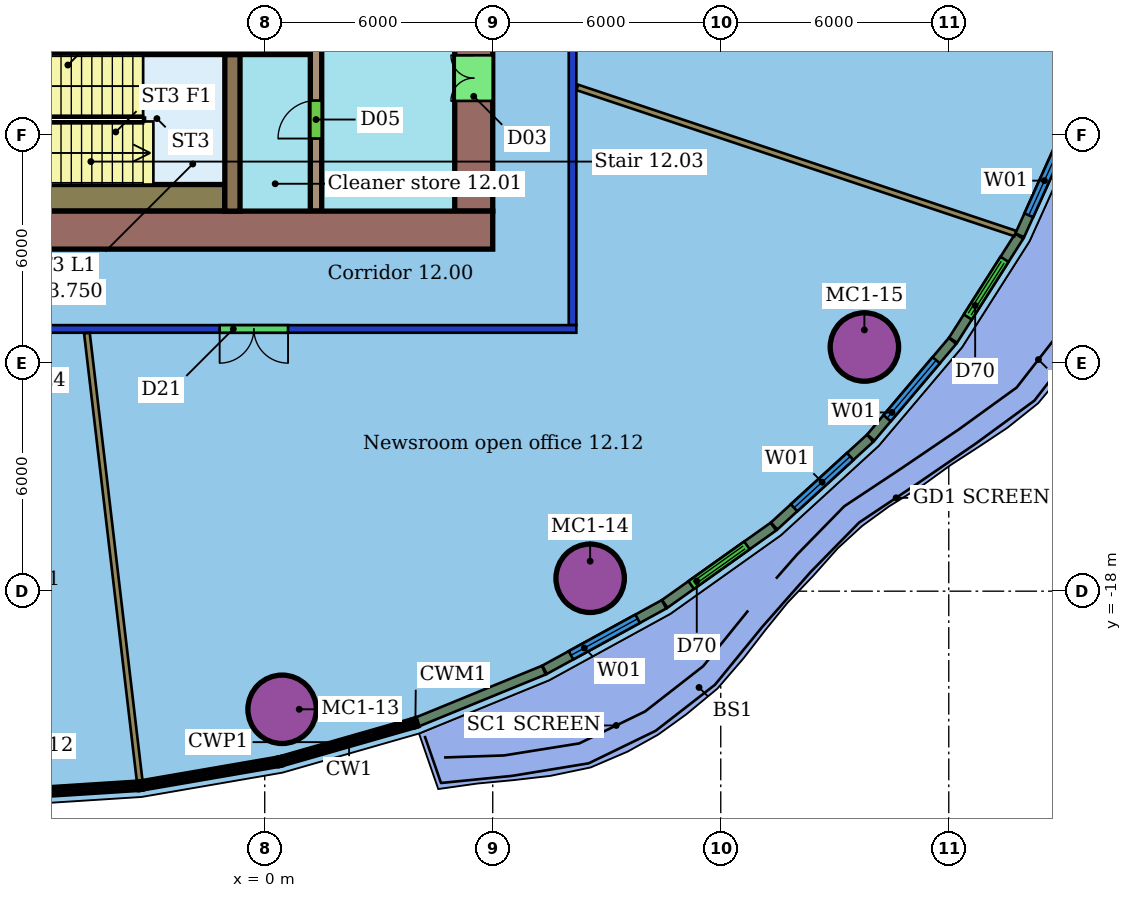
"""IFC4 building model, lengths in metres.
Left out: names, types, materials, properties, quantities, classifications, styles, units other than length and angle.
Written with IfcOpenShell. Run it as: python <this file> out.ifc"""

import sys

from ifc_helpers import new_model, si_unit, direction, frame, frame_2d, origin, origin_2d, place, context, subcontext, project, spatial, rectangle, hollow_circle, extrude, element, fill, save


model = new_model("IFC4")
c1 = context("Model", 3, precision=1e-05, world=origin(), true_north=direction((0.0, 1.0)))
c2 = subcontext(c1, "Body", "Model", "MODEL_VIEW")
j1 = project(units=[si_unit("LENGTHUNIT", "METRE"), si_unit("PLANEANGLEUNIT", "RADIAN")], contexts=[c1])
p1 = place(None, origin())
s1 = spatial("IfcSite", under=j1, at=p1, CompositionType="ELEMENT")
p2 = place(p1, origin())
s2 = spatial("IfcBuilding", under=s1, at=p2, CompositionType="ELEMENT")
p3 = place(p2, frame((0.0, 0.0, 61.9)))
s3 = spatial("IfcBuildingStorey", under=s2, at=p3, CompositionType="ELEMENT", Elevation=61.9)
for number, where, z_axis, x_axis in (
    (1, (0.458, -21.108, 0.0), (0.0, 0.0, 1.0), (1.0, 0.0, 0.0)),
    (2, (8.563, -17.66, 0.0), (0.0, 0.0, 1.0), (1.0, 0.0, 0.0)),
    (3, (15.78, -11.576, 0.0), (0.0, 0.0, 1.0), (1.0, 0.0, 0.0)),
):
    element("IfcColumn", number, at=place(p3, frame(where, z_axis=z_axis, x_axis=x_axis)), inside=s3, PredefinedType="COLUMN", context=c2, shape_type="SweptSolid", body=[
        extrude(hollow_circle(Radius=0.9, WallThickness=0.06, at=origin_2d()), origin(), (0.0, 0.0, 1.0), 3.55),
    ])
p4 = place(p3, frame((8.2, -11.1, 0.0), z_axis=(0.0, 0.0, 1.0), x_axis=(-1.0, 0.0, 0.0)))
e4 = element("IfcWall", 4, at=p4, inside=s3, PredefinedType="PARTITIONING", context=c2, shape_type="SweptSolid", body=[
    extrude(rectangle(XDim=28.4, YDim=0.2, at=frame_2d((14.2, 0.0))), origin(), (0.0, 0.0, 1.0), 2.85),
])
p5 = place(p4, frame((20.22, 0.0, 0.0)))
e5 = element("IfcOpeningElement", 5, at=p5, cuts=e4, PredefinedType="OPENING", context=c2, shape_type="SweptSolid", body=[
    extrude(rectangle(XDim=1.1, YDim=2.1, at=frame_2d((0.55, 1.05))), frame((0.0, 0.11, 0.0), z_axis=(0.0, -1.0, 0.0), x_axis=(1.0, 0.0, 0.0)), (0.0, 0.0, 1.0), 0.22),
])
p6 = place(p4, frame((15.445, 0.0, 0.0)))
e6 = element("IfcOpeningElement", 6, at=p6, cuts=e4, PredefinedType="OPENING", context=c2, shape_type="SweptSolid", body=[
    extrude(rectangle(XDim=1.5, YDim=2.1, at=frame_2d((0.75, 1.05))), frame((0.0, 0.11, 0.0), z_axis=(0.0, -1.0, 0.0), x_axis=(1.0, 0.0, 0.0)), (0.0, 0.0, 1.0), 0.22),
])
p7 = place(p4, frame((7.586, 0.0, 0.0)))
e7 = element("IfcOpeningElement", 7, at=p7, cuts=e4, PredefinedType="OPENING", context=c2, shape_type="SweptSolid", body=[
    extrude(rectangle(XDim=1.8, YDim=2.1, at=frame_2d((0.9, 1.05))), frame((0.0, 0.11, 0.0), z_axis=(0.0, -1.0, 0.0), x_axis=(1.0, 0.0, 0.0)), (0.0, 0.0, 1.0), 0.22),
])
p8 = place(p3, frame((8.1, 11.0, 0.0), z_axis=(0.0, 0.0, 1.0), x_axis=(0.0, -1.0, 0.0)))
e8 = element("IfcWall", 8, at=p8, inside=s3, PredefinedType="PARTITIONING", context=c2, shape_type="SweptSolid", body=[
    extrude(rectangle(XDim=22.0, YDim=0.2, at=frame_2d((11.0, 0.0))), origin(), (0.0, 0.0, 1.0), 2.85),
])
p9 = place(p8, frame((6.209, 0.0, 0.0)))
e9 = element("IfcOpeningElement", 9, at=p9, cuts=e8, PredefinedType="OPENING", context=c2, shape_type="SweptSolid", body=[
    extrude(rectangle(XDim=1.1, YDim=2.1, at=frame_2d((0.55, 1.05))), frame((0.0, 0.11, 0.0), z_axis=(0.0, -1.0, 0.0), x_axis=(1.0, 0.0, 0.0)), (0.0, 0.0, 1.0), 0.22),
])
p10 = place(p8, frame((12.983, 0.0, 0.0)))
e10 = element("IfcOpeningElement", 10, at=p10, cuts=e8, PredefinedType="OPENING", context=c2, shape_type="SweptSolid", body=[
    extrude(rectangle(XDim=0.9, YDim=2.1, at=frame_2d((0.45, 1.05))), frame((0.0, 0.11, 0.0), z_axis=(0.0, -1.0, 0.0), x_axis=(1.0, 0.0, 0.0)), (0.0, 0.0, 1.0), 0.22),
])
p11 = place(p3, frame((-3.291, -22.993, 0.0), z_axis=(0.0, 0.0, 1.0), x_axis=(-0.117014349032, 0.99313022415, 0.0)))
e11 = element("IfcWall", 11, at=p11, inside=s3, PredefinedType="PARTITIONING", context=c2, shape_type="SweptSolid", body=[
    extrude(rectangle(XDim=11.865, YDim=0.15, at=frame_2d((5.933, 0.0))), origin(), (0.0, 0.0, 1.0), 3.55),
])
p12 = place(p3, frame((19.752, -8.589, 0.0), z_axis=(0.0, 0.0, 1.0), x_axis=(-0.948621001224, 0.316414595169, 0.0)))
e12 = element("IfcWall", 12, at=p12, inside=s3, PredefinedType="PARTITIONING", context=c2, shape_type="SweptSolid", body=[
    extrude(rectangle(XDim=12.152, YDim=0.15, at=frame_2d((6.076, 0.0))), origin(), (0.0, 0.0, 1.0), 3.55),
])
p13 = place(p3, frame((4.013, -21.441, 0.0), z_axis=(0.0, 0.0, 1.0), x_axis=(0.925429153504, 0.378920680149, 0.0)))
e13 = element("IfcWall", 13, at=p13, inside=s3, PredefinedType="SOLIDWALL", context=c2, shape_type="SweptSolid", body=[
    extrude(rectangle(XDim=3.6, YDim=0.25, at=frame_2d((1.8, 0.0))), origin(), (0.0, 0.0, 1.0), 3.15),
])
p14 = place(p3, frame((7.365, -20.068, 0.0), z_axis=(0.0, 0.0, 1.0), x_axis=(0.876938377575, 0.480602831802, 0.0)))
e14 = element("IfcWall", 14, at=p14, inside=s3, PredefinedType="SOLIDWALL", context=c2, shape_type="SweptSolid", body=[
    extrude(rectangle(XDim=3.584, YDim=0.25, at=frame_2d((1.792, 0.0))), origin(), (0.0, 0.0, 1.0), 3.15),
])
p15 = place(p14, frame((0.792, 0.0, 0.8)))
e15 = element("IfcOpeningElement", 15, at=p15, cuts=e14, PredefinedType="OPENING", context=c2, shape_type="SweptSolid", body=[
    extrude(rectangle(XDim=2.0, YDim=2.2, at=frame_2d((1.0, 1.1))), frame((0.0, 0.135, 0.0), z_axis=(0.0, -1.0, 0.0), x_axis=(1.0, 0.0, 0.0)), (0.0, 0.0, 1.0), 0.27),
])
p16 = place(p3, frame((10.526, -18.333, 0.0), z_axis=(0.0, 0.0, 1.0), x_axis=(0.814907125468, 0.579591560378, 0.0)))
e16 = element("IfcWall", 16, at=p16, inside=s3, PredefinedType="SOLIDWALL", context=c2, shape_type="SweptSolid", body=[
    extrude(rectangle(XDim=3.509, YDim=0.25, at=frame_2d((1.754, 0.0))), origin(), (0.0, 0.0, 1.0), 3.15),
])
p17 = place(p16, frame((0.854, 0.0, 0.0)))
e17 = element("IfcOpeningElement", 17, at=p17, cuts=e16, PredefinedType="OPENING", context=c2, shape_type="SweptSolid", body=[
    extrude(rectangle(XDim=1.8, YDim=2.4, at=frame_2d((0.9, 1.2))), frame((0.0, 0.135, 0.0), z_axis=(0.0, -1.0, 0.0), x_axis=(1.0, 0.0, 0.0)), (0.0, 0.0, 1.0), 0.27),
])
p18 = place(p3, frame((13.404, -16.285, 0.0), z_axis=(0.0, 0.0, 1.0), x_axis=(0.738233763611, 0.67454496534, 0.0)))
e18 = element("IfcWall", 18, at=p18, inside=s3, PredefinedType="SOLIDWALL", context=c2, shape_type="SweptSolid", body=[
    extrude(rectangle(XDim=3.423, YDim=0.25, at=frame_2d((1.711, 0.0))), origin(), (0.0, 0.0, 1.0), 3.15),
])
p19 = place(p18, frame((0.712, 0.0, 0.8)))
e19 = element("IfcOpeningElement", 19, at=p19, cuts=e18, PredefinedType="OPENING", context=c2, shape_type="SweptSolid", body=[
    extrude(rectangle(XDim=2.0, YDim=2.2, at=frame_2d((1.0, 1.1))), frame((0.0, 0.135, 0.0), z_axis=(0.0, -1.0, 0.0), x_axis=(1.0, 0.0, 0.0)), (0.0, 0.0, 1.0), 0.27),
])
p20 = place(p3, frame((15.948, -13.959, 0.0), z_axis=(0.0, 0.0, 1.0), x_axis=(0.645781290873, 0.763522445222, 0.0)))
e20 = element("IfcWall", 20, at=p20, inside=s3, PredefinedType="SOLIDWALL", context=c2, shape_type="SweptSolid", body=[
    extrude(rectangle(XDim=3.332, YDim=0.25, at=frame_2d((1.666, 0.0))), origin(), (0.0, 0.0, 1.0), 3.15),
])
p21 = place(p20, frame((0.666, 0.0, 0.8)))
e21 = element("IfcOpeningElement", 21, at=p21, cuts=e20, PredefinedType="OPENING", context=c2, shape_type="SweptSolid", body=[
    extrude(rectangle(XDim=2.0, YDim=2.2, at=frame_2d((1.0, 1.1))), frame((0.0, 0.135, 0.0), z_axis=(0.0, -1.0, 0.0), x_axis=(1.0, 0.0, 0.0)), (0.0, 0.0, 1.0), 0.27),
])
p22 = place(p3, frame((18.114, -11.395, 0.0), z_axis=(0.0, 0.0, 1.0), x_axis=(0.536899857644, 0.843645981951, 0.0)))
e22 = element("IfcWall", 22, at=p22, inside=s3, PredefinedType="SOLIDWALL", context=c2, shape_type="SweptSolid", body=[
    extrude(rectangle(XDim=3.242, YDim=0.25, at=frame_2d((1.621, 0.0))), origin(), (0.0, 0.0, 1.0), 3.15),
])
p23 = place(p22, frame((0.721, 0.0, 0.0)))
e23 = element("IfcOpeningElement", 23, at=p23, cuts=e22, PredefinedType="OPENING", context=c2, shape_type="SweptSolid", body=[
    extrude(rectangle(XDim=1.8, YDim=2.4, at=frame_2d((0.9, 1.2))), frame((0.0, 0.135, 0.0), z_axis=(0.0, -1.0, 0.0), x_axis=(1.0, 0.0, 0.0)), (0.0, 0.0, 1.0), 0.27),
])
p24 = place(p3, frame((19.867, -8.637, 0.0), z_axis=(0.0, 0.0, 1.0), x_axis=(0.411804193901, 0.911272355493, 0.0)))
e24 = element("IfcWall", 24, at=p24, inside=s3, PredefinedType="SOLIDWALL", context=c2, shape_type="SweptSolid", body=[
    extrude(rectangle(XDim=3.158, YDim=0.25, at=frame_2d((1.579, 0.0))), origin(), (0.0, 0.0, 1.0), 3.15),
])
p25 = place(p24, frame((0.579, 0.0, 0.8)))
e25 = element("IfcOpeningElement", 25, at=p25, cuts=e24, PredefinedType="OPENING", context=c2, shape_type="SweptSolid", body=[
    extrude(rectangle(XDim=2.0, YDim=2.2, at=frame_2d((1.0, 1.1))), frame((0.0, 0.135, 0.0), z_axis=(0.0, -1.0, 0.0), x_axis=(1.0, 0.0, 0.0)), (0.0, 0.0, 1.0), 0.27),
])
p26 = place(p3, frame((-18.0, -8.5, 0.0), z_axis=(0.0, 0.0, 1.0), x_axis=(1.0, 0.0, 0.0)))
e26 = element("IfcWall", 26, at=p26, inside=s3, PredefinedType="SHEAR", context=c2, shape_type="SweptSolid", body=[
    extrude(rectangle(XDim=24.0, YDim=1.0, at=frame_2d((12.0, 0.0))), origin(), (0.0, 0.0, 1.0), 3.4),
])
p27 = place(p26, frame((6.0, 0.0, 0.0)))
e27 = element("IfcOpeningElement", 27, at=p27, cuts=e26, PredefinedType="OPENING", context=c2, shape_type="SweptSolid", body=[
    extrude(rectangle(XDim=1.2, YDim=2.1, at=frame_2d((0.6, 1.05))), frame((0.0, 0.51, 0.0), z_axis=(0.0, -1.0, 0.0), x_axis=(1.0, 0.0, 0.0)), (0.0, 0.0, 1.0), 1.02),
])
p28 = place(p3, frame((5.5, -8.0, 0.0), z_axis=(0.0, 0.0, 1.0), x_axis=(0.0, 1.0, 0.0)))
e28 = element("IfcWall", 28, at=p28, inside=s3, PredefinedType="SHEAR", context=c2, shape_type="SweptSolid", body=[
    extrude(rectangle(XDim=16.0, YDim=1.0, at=frame_2d((8.0, 0.0))), origin(), (0.0, 0.0, 1.0), 3.4),
])
p29 = place(p28, frame((2.9, 0.0, 0.0)))
e29 = element("IfcOpeningElement", 29, at=p29, cuts=e28, PredefinedType="OPENING", context=c2, shape_type="SweptSolid", body=[
    extrude(rectangle(XDim=1.2, YDim=2.1, at=frame_2d((0.6, 1.05))), frame((0.0, 0.51, 0.0), z_axis=(0.0, -1.0, 0.0), x_axis=(1.0, 0.0, 0.0)), (0.0, 0.0, 1.0), 1.02),
])
p30 = place(p28, frame((11.9, 0.0, 0.0)))
e30 = element("IfcOpeningElement", 30, at=p30, cuts=e28, PredefinedType="OPENING", context=c2, shape_type="SweptSolid", body=[
    extrude(rectangle(XDim=1.2, YDim=2.1, at=frame_2d((0.6, 1.05))), frame((0.0, 0.51, 0.0), z_axis=(0.0, -1.0, 0.0), x_axis=(1.0, 0.0, 0.0)), (0.0, 0.0, 1.0), 1.02),
])
p31 = place(p3, frame((-6.0, -3.58, 0.0), z_axis=(0.0, 0.0, 1.0), x_axis=(1.0, 0.0, 0.0)))
e31 = element("IfcWall", 31, at=p31, inside=s3, PredefinedType="SHEAR", context=c2, shape_type="SweptSolid", body=[
    extrude(rectangle(XDim=7.2, YDim=0.6, at=frame_2d((3.6, 0.0))), origin(), (0.0, 0.0, 1.0), 3.4),
])
p32 = place(p3, frame((1.35, -8.0, 0.0), z_axis=(0.0, 0.0, 1.0), x_axis=(0.0, 1.0, 0.0)))
e32 = element("IfcWall", 32, at=p32, inside=s3, PredefinedType="SHEAR", context=c2, shape_type="SweptSolid", body=[
    extrude(rectangle(XDim=16.0, YDim=0.3, at=frame_2d((8.0, 0.0))), origin(), (0.0, 0.0, 1.0), 3.4),
])
p33 = place(p32, frame((1.91, 0.0, 0.0)))
e33 = element("IfcOpeningElement", 33, at=p33, cuts=e32, PredefinedType="OPENING", context=c2, shape_type="SweptSolid", body=[
    extrude(rectangle(XDim=1.0, YDim=2.1, at=frame_2d((0.5, 1.05))), frame((0.0, 0.16, 0.0), z_axis=(0.0, -1.0, 0.0), x_axis=(1.0, 0.0, 0.0)), (0.0, 0.0, 1.0), 0.32),
])
p34 = place(p32, frame((7.25, 0.0, 0.0)))
e34 = element("IfcOpeningElement", 34, at=p34, cuts=e32, PredefinedType="OPENING", context=c2, shape_type="SweptSolid", body=[
    extrude(rectangle(XDim=1.5, YDim=2.1, at=frame_2d((0.75, 1.05))), frame((0.0, 0.16, 0.0), z_axis=(0.0, -1.0, 0.0), x_axis=(1.0, 0.0, 0.0)), (0.0, 0.0, 1.0), 0.32),
])
p35 = place(p3, frame((-0.85, -3.88, 0.0), z_axis=(0.0, 0.0, 1.0), x_axis=(0.0, -1.0, 0.0)))
e35 = element("IfcWall", 35, at=p35, inside=s3, PredefinedType="SHEAR", context=c2, shape_type="SweptSolid", body=[
    extrude(rectangle(XDim=4.12, YDim=0.4, at=frame_2d((2.06, 0.0))), origin(), (0.0, 0.0, 1.0), 3.4),
])
p36 = place(p3, frame((-8.1, -7.65, 0.0), z_axis=(0.0, 0.0, 1.0), x_axis=(1.0, 0.0, 0.0)))
e36 = element("IfcWall", 36, at=p36, inside=s3, PredefinedType="SHEAR", context=c2, shape_type="SweptSolid", body=[
    extrude(rectangle(XDim=7.05, YDim=0.7, at=frame_2d((3.525, 0.0))), origin(), (0.0, 0.0, 1.0), 3.4),
])
p37 = place(p7, origin())
e37 = element("IfcDoor", 37, at=p37, inside=s3, OperationType="DOUBLE_DOOR_SINGLE_SWING", PredefinedType="DOOR", context=c2, shape_type="SweptSolid", body=[
    extrude(rectangle(XDim=1.8, YDim=2.1, at=frame_2d((0.9, 1.05))), frame((0.0, 0.025, 0.0), z_axis=(0.0, -1.0, 0.0), x_axis=(1.0, 0.0, 0.0)), (0.0, 0.0, 1.0), 0.05),
])
fill(e7, e37)
p38 = place(p15, origin())
e38 = element("IfcWindow", 38, at=p38, inside=s3, PartitioningType="SINGLE_PANEL", PredefinedType="WINDOW", context=c2, shape_type="SweptSolid", body=[
    extrude(rectangle(XDim=2.0, YDim=2.2, at=frame_2d((1.0, 1.1))), frame((0.0, 0.03, 0.0), z_axis=(0.0, -1.0, 0.0), x_axis=(1.0, 0.0, 0.0)), (0.0, 0.0, 1.0), 0.06),
])
fill(e15, e38)
p39 = place(p17, origin())
e39 = element("IfcDoor", 39, at=p39, inside=s3, OperationType="DOUBLE_DOOR_SLIDING", PredefinedType="DOOR", context=c2, shape_type="SweptSolid", body=[
    extrude(rectangle(XDim=1.8, YDim=2.4, at=frame_2d((0.9, 1.2))), frame((0.0, 0.025, 0.0), z_axis=(0.0, -1.0, 0.0), x_axis=(1.0, 0.0, 0.0)), (0.0, 0.0, 1.0), 0.05),
])
fill(e17, e39)
p40 = place(p19, origin())
e40 = element("IfcWindow", 40, at=p40, inside=s3, PartitioningType="SINGLE_PANEL", PredefinedType="WINDOW", context=c2, shape_type="SweptSolid", body=[
    extrude(rectangle(XDim=2.0, YDim=2.2, at=frame_2d((1.0, 1.1))), frame((0.0, 0.03, 0.0), z_axis=(0.0, -1.0, 0.0), x_axis=(1.0, 0.0, 0.0)), (0.0, 0.0, 1.0), 0.06),
])
fill(e19, e40)
p41 = place(p21, origin())
e41 = element("IfcWindow", 41, at=p41, inside=s3, PartitioningType="SINGLE_PANEL", PredefinedType="WINDOW", context=c2, shape_type="SweptSolid", body=[
    extrude(rectangle(XDim=2.0, YDim=2.2, at=frame_2d((1.0, 1.1))), frame((0.0, 0.03, 0.0), z_axis=(0.0, -1.0, 0.0), x_axis=(1.0, 0.0, 0.0)), (0.0, 0.0, 1.0), 0.06),
])
fill(e21, e41)
p42 = place(p23, origin())
e42 = element("IfcDoor", 42, at=p42, inside=s3, OperationType="DOUBLE_DOOR_SLIDING", PredefinedType="DOOR", context=c2, shape_type="SweptSolid", body=[
    extrude(rectangle(XDim=1.8, YDim=2.4, at=frame_2d((0.9, 1.2))), frame((0.0, 0.025, 0.0), z_axis=(0.0, -1.0, 0.0), x_axis=(1.0, 0.0, 0.0)), (0.0, 0.0, 1.0), 0.05),
])
fill(e23, e42)
p43 = place(p25, origin())
e43 = element("IfcWindow", 43, at=p43, inside=s3, PartitioningType="SINGLE_PANEL", PredefinedType="WINDOW", context=c2, shape_type="SweptSolid", body=[
    extrude(rectangle(XDim=2.0, YDim=2.2, at=frame_2d((1.0, 1.1))), frame((0.0, 0.03, 0.0), z_axis=(0.0, -1.0, 0.0), x_axis=(1.0, 0.0, 0.0)), (0.0, 0.0, 1.0), 0.06),
])
fill(e25, e43)
p44 = place(p29, origin())
e44 = element("IfcDoor", 44, at=p44, inside=s3, OperationType="DOUBLE_DOOR_SINGLE_SWING", PredefinedType="NOTDEFINED", context=c2, shape_type="SweptSolid", body=[
    extrude(rectangle(XDim=1.2, YDim=2.1, at=frame_2d((0.6, 1.05))), frame((0.0, 0.025, 0.0), z_axis=(0.0, -1.0, 0.0), x_axis=(1.0, 0.0, 0.0)), (0.0, 0.0, 1.0), 0.05),
])
fill(e29, e44)
p45 = place(p33, origin())
e45 = element("IfcDoor", 45, at=p45, inside=s3, OperationType="SINGLE_SWING_LEFT", PredefinedType="NOTDEFINED", context=c2, shape_type="SweptSolid", body=[
    extrude(rectangle(XDim=1.0, YDim=2.1, at=frame_2d((0.5, 1.05))), frame((0.0, 0.025, 0.0), z_axis=(0.0, -1.0, 0.0), x_axis=(1.0, 0.0, 0.0)), (0.0, 0.0, 1.0), 0.05),
])
fill(e33, e45)
save(model, sys.argv[1])
